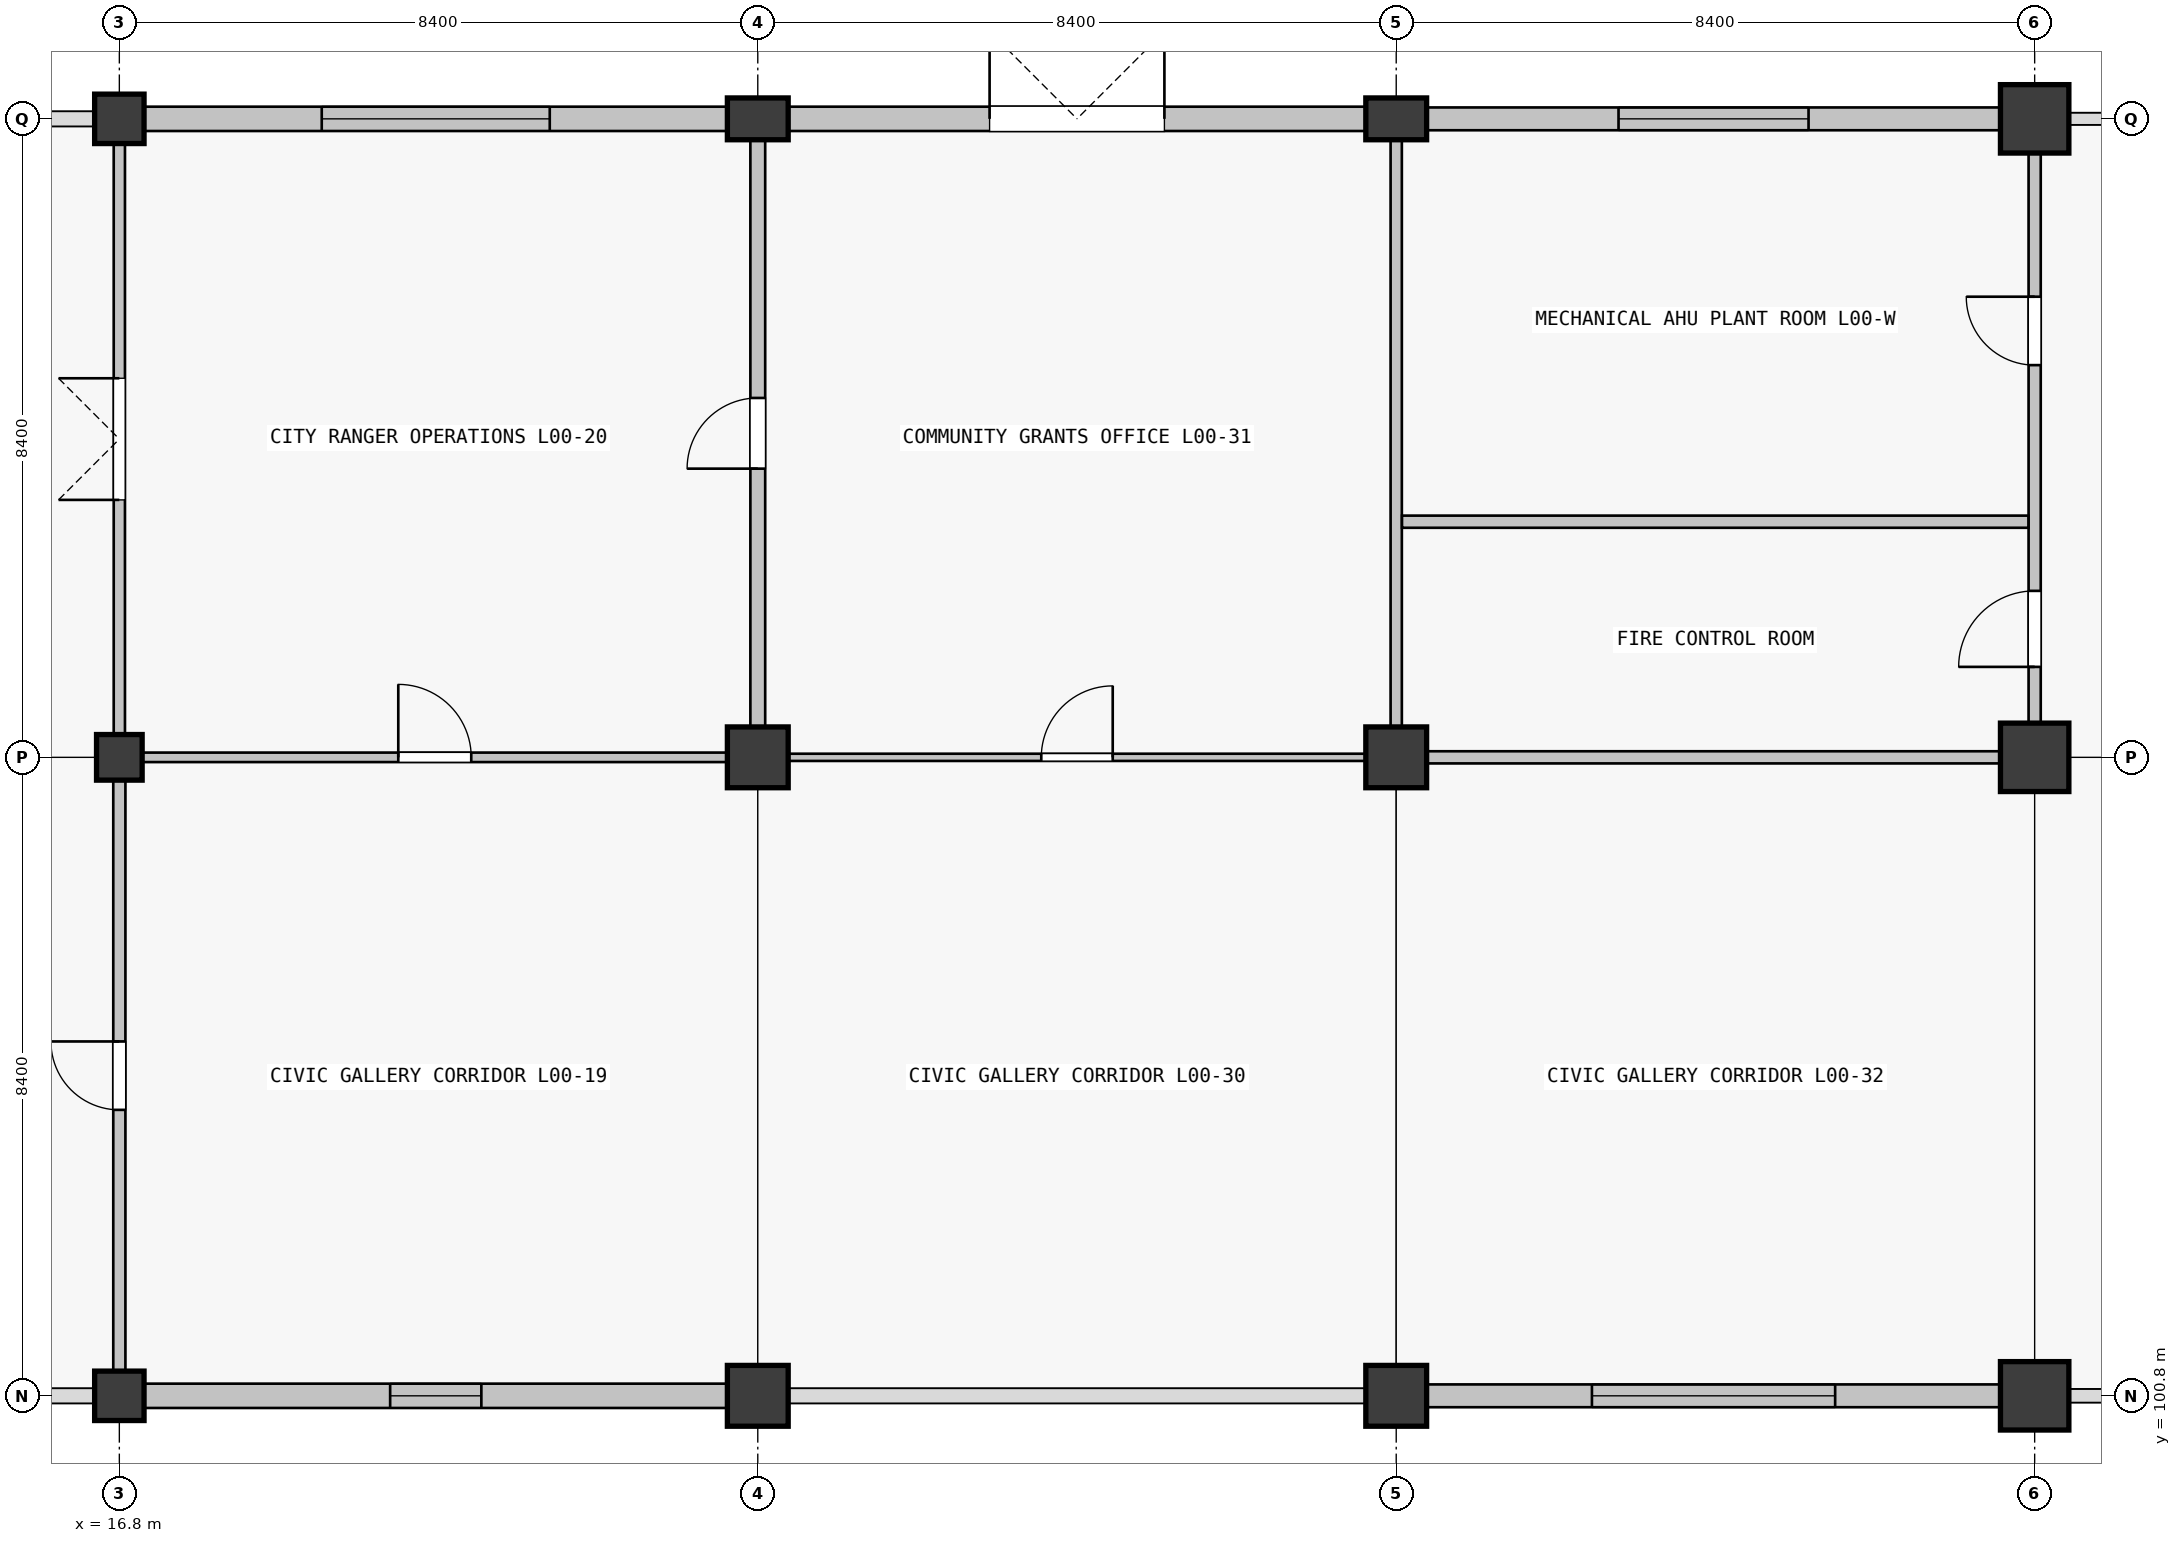
"""IFC4 building model, lengths in metres.
Left out: names, types, materials, properties, quantities, classifications, styles, units other than length and angle.
Written with IfcOpenShell. Run it as: python <this file> out.ifc"""

import sys

from ifc_helpers import new_model, si_unit, direction, frame, frame_2d, origin, origin_2d, place, context, subcontext, project, spatial, rectangle, extrude, element, fill, save


model = new_model("IFC4")
c1 = context("Model", 3, precision=1e-05, world=origin(), true_north=direction((0.0, 1.0)))
c2 = subcontext(c1, "Body", "Model", "MODEL_VIEW")
j1 = project(units=[si_unit("LENGTHUNIT", "METRE"), si_unit("PLANEANGLEUNIT", "RADIAN")], contexts=[c1])
p1 = place(None, origin())
s1 = spatial("IfcSite", under=j1, at=p1, CompositionType="ELEMENT")
p2 = place(p1, origin())
s2 = spatial("IfcBuilding", under=s1, at=p2, CompositionType="ELEMENT")
p3 = place(p2, origin())
s3 = spatial("IfcBuildingStorey", under=s2, at=p3, CompositionType="ELEMENT", Elevation=0.0)
p4 = place(p3, frame((16.8, 100.8, 0.0), z_axis=(0.0, 0.0, 1.0), x_axis=(1.0, 0.0, 0.0)))
e1 = element("IfcColumn", 1, at=p4, inside=s3, PredefinedType="COLUMN", context=c2, shape_type="SweptSolid", body=[
    extrude(rectangle(XDim=0.65, YDim=0.65, at=origin_2d()), origin(), (0.0, 0.0, 1.0), 5.76),
])
p5 = place(p3, frame((16.8, 109.2, 0.0), z_axis=(0.0, 0.0, 1.0), x_axis=(1.0, 0.0, 0.0)))
e2 = element("IfcColumn", 2, at=p5, inside=s3, PredefinedType="COLUMN", context=c2, shape_type="SweptSolid", body=[
    extrude(rectangle(XDim=0.6, YDim=0.6, at=origin_2d()), origin(), (0.0, 0.0, 1.0), 5.76),
])
p6 = place(p3, frame((16.8, 117.6, 0.0), z_axis=(0.0, 0.0, 1.0), x_axis=(1.0, 0.0, 0.0)))
e3 = element("IfcColumn", 3, at=p6, inside=s3, PredefinedType="COLUMN", context=c2, shape_type="SweptSolid", body=[
    extrude(rectangle(XDim=0.65, YDim=0.65, at=origin_2d()), origin(), (0.0, 0.0, 1.0), 5.76),
])
for number, where, z_axis, x_axis in (
    (4, (25.2, 100.8, 0.0), (0.0, 0.0, 1.0), (1.0, 0.0, 0.0)),
    (5, (25.2, 109.2, 0.0), (0.0, 0.0, 1.0), (1.0, 0.0, 0.0)),
):
    element("IfcColumn", number, at=place(p3, frame(where, z_axis=z_axis, x_axis=x_axis)), inside=s3, PredefinedType="COLUMN", context=c2, shape_type="SweptSolid", body=[
        extrude(rectangle(XDim=0.8, YDim=0.8, at=origin_2d()), origin(), (0.0, 0.0, 1.0), 5.76),
    ])
p7 = place(p3, frame((25.2, 117.6, 0.0), z_axis=(0.0, 0.0, 1.0), x_axis=(1.0, 0.0, 0.0)))
e6 = element("IfcColumn", 6, at=p7, inside=s3, PredefinedType="COLUMN", context=c2, shape_type="SweptSolid", body=[
    extrude(rectangle(XDim=0.8, YDim=0.55, at=origin_2d()), origin(), (0.0, 0.0, 1.0), 5.76),
])
for number, where, z_axis, x_axis in (
    (7, (33.6, 100.8, 0.0), (0.0, 0.0, 1.0), (1.0, 0.0, 0.0)),
    (8, (33.6, 109.2, 0.0), (0.0, 0.0, 1.0), (1.0, 0.0, 0.0)),
):
    element("IfcColumn", number, at=place(p3, frame(where, z_axis=z_axis, x_axis=x_axis)), inside=s3, PredefinedType="COLUMN", context=c2, shape_type="SweptSolid", body=[
        extrude(rectangle(XDim=0.8, YDim=0.8, at=origin_2d()), origin(), (0.0, 0.0, 1.0), 5.76),
    ])
p8 = place(p3, frame((33.6, 117.6, 0.0), z_axis=(0.0, 0.0, 1.0), x_axis=(1.0, 0.0, 0.0)))
e9 = element("IfcColumn", 9, at=p8, inside=s3, PredefinedType="COLUMN", context=c2, shape_type="SweptSolid", body=[
    extrude(rectangle(XDim=0.8, YDim=0.55, at=origin_2d()), origin(), (0.0, 0.0, 1.0), 5.76),
])
for number, where, z_axis, x_axis in (
    (10, (42.0, 100.8, 0.0), (0.0, 0.0, 1.0), (1.0, 0.0, 0.0)),
    (11, (42.0, 109.2, 0.0), (0.0, 0.0, 1.0), (1.0, 0.0, 0.0)),
    (12, (42.0, 117.6, 0.0), (0.0, 0.0, 1.0), (1.0, 0.0, 0.0)),
):
    element("IfcColumn", number, at=place(p3, frame(where, z_axis=z_axis, x_axis=x_axis)), inside=s3, PredefinedType="COLUMN", context=c2, shape_type="SweptSolid", body=[
        extrude(rectangle(XDim=0.9, YDim=0.9, at=origin_2d()), origin(), (0.0, 0.0, 1.0), 5.76),
    ])
p9 = place(p3, frame((24.799, 100.8, 0.0), z_axis=(0.0, 0.0, 1.0), x_axis=(-1.0, 0.0, 0.0)))
e13 = element("IfcWall", 13, at=p9, inside=s3, PredefinedType="SOLIDWALL", context=c2, shape_type="SweptSolid", body=[
    extrude(rectangle(XDim=7.673, YDim=0.32, at=frame_2d((3.836, 0.0))), origin(), (0.0, 0.0, 1.0), 4.7),
])
p10 = place(p9, frame((3.236, 0.0, 0.9)))
e14 = element("IfcOpeningElement", 14, at=p10, cuts=e13, PredefinedType="OPENING", context=c2, shape_type="SweptSolid", body=[
    extrude(rectangle(XDim=1.2, YDim=2.1, at=frame_2d((0.6, 1.05))), frame((0.0, 0.16, 0.0), z_axis=(0.0, -1.0, 0.0), x_axis=(1.0, 0.0, 0.0)), (0.0, 0.0, 1.0), 0.32),
])
p11 = place(p3, frame((17.126, 117.6, 0.0), z_axis=(0.0, 0.0, 1.0), x_axis=(1.0, 0.0, 0.0)))
e15 = element("IfcWall", 15, at=p11, inside=s3, PredefinedType="SOLIDWALL", context=c2, shape_type="SweptSolid", body=[
    extrude(rectangle(XDim=7.673, YDim=0.32, at=frame_2d((3.836, 0.0))), origin(), (0.0, 0.0, 1.0), 4.7),
])
p12 = place(p11, frame((2.337, 0.0, 0.9)))
e16 = element("IfcOpeningElement", 16, at=p12, cuts=e15, PredefinedType="OPENING", context=c2, shape_type="SweptSolid", body=[
    extrude(rectangle(XDim=3.0, YDim=1.2, at=frame_2d((1.5, 0.6))), frame((0.0, 0.16, 0.0), z_axis=(0.0, -1.0, 0.0), x_axis=(1.0, 0.0, 0.0)), (0.0, 0.0, 1.0), 0.32),
])
p13 = place(p3, frame((25.601, 117.6, 0.0), z_axis=(0.0, 0.0, 1.0), x_axis=(1.0, 0.0, 0.0)))
e17 = element("IfcWall", 17, at=p13, inside=s3, PredefinedType="SOLIDWALL", context=c2, shape_type="SweptSolid", body=[
    extrude(rectangle(XDim=7.598, YDim=0.32, at=frame_2d((3.799, 0.0))), origin(), (0.0, 0.0, 1.0), 4.7),
])
p14 = place(p13, frame((2.649, 0.0, 0.0)))
e18 = element("IfcOpeningElement", 18, at=p14, cuts=e17, PredefinedType="OPENING", context=c2, shape_type="SweptSolid", body=[
    extrude(rectangle(XDim=2.3, YDim=2.3, at=frame_2d((1.15, 1.15))), frame((0.0, 0.16, 0.0), z_axis=(0.0, -1.0, 0.0), x_axis=(1.0, 0.0, 0.0)), (0.0, 0.0, 1.0), 0.32),
])
p15 = place(p3, frame((41.549, 100.8, 0.0), z_axis=(0.0, 0.0, 1.0), x_axis=(-1.0, 0.0, 0.0)))
e19 = element("IfcWall", 19, at=p15, inside=s3, PredefinedType="SOLIDWALL", context=c2, shape_type="SweptSolid", body=[
    extrude(rectangle(XDim=7.548, YDim=0.3, at=frame_2d((3.774, 0.0))), origin(), (0.0, 0.0, 1.0), 4.7),
])
p16 = place(p15, frame((2.174, 0.0, 0.9)))
e20 = element("IfcOpeningElement", 20, at=p16, cuts=e19, PredefinedType="OPENING", context=c2, shape_type="SweptSolid", body=[
    extrude(rectangle(XDim=3.2, YDim=1.75, at=frame_2d((1.6, 0.875))), frame((0.0, 0.15, 0.0), z_axis=(0.0, -1.0, 0.0), x_axis=(1.0, 0.0, 0.0)), (0.0, 0.0, 1.0), 0.3),
])
p17 = place(p3, frame((34.001, 117.6, 0.0), z_axis=(0.0, 0.0, 1.0), x_axis=(1.0, 0.0, 0.0)))
e21 = element("IfcWall", 21, at=p17, inside=s3, PredefinedType="SOLIDWALL", context=c2, shape_type="SweptSolid", body=[
    extrude(rectangle(XDim=7.548, YDim=0.3, at=frame_2d((3.774, 0.0))), origin(), (0.0, 0.0, 1.0), 4.7),
])
p18 = place(p17, frame((2.524, 0.0, 0.9)))
e22 = element("IfcOpeningElement", 22, at=p18, cuts=e21, PredefinedType="OPENING", context=c2, shape_type="SweptSolid", body=[
    extrude(rectangle(XDim=2.5, YDim=1.65, at=frame_2d((1.25, 0.825))), frame((0.0, 0.15, 0.0), z_axis=(0.0, -1.0, 0.0), x_axis=(1.0, 0.0, 0.0)), (0.0, 0.0, 1.0), 0.3),
])
p19 = place(p3, frame((17.102, 109.2, 0.0), z_axis=(0.0, 0.0, 1.0), x_axis=(1.0, 0.0, 0.0)))
e23 = element("IfcWall", 23, at=p19, inside=s3, PredefinedType="PARTITIONING", context=c2, shape_type="SweptSolid", body=[
    extrude(rectangle(XDim=7.696, YDim=0.125, at=frame_2d((3.848, 0.0))), origin(), (0.0, 0.0, 1.0), 3.66),
])
p20 = place(p19, frame((3.368, 0.0, 0.0)))
e24 = element("IfcOpeningElement", 24, at=p20, cuts=e23, PredefinedType="OPENING", context=c2, shape_type="SweptSolid", body=[
    extrude(rectangle(XDim=0.96, YDim=2.18, at=frame_2d((0.48, 1.09))), frame((0.0, 0.062, 0.0), z_axis=(0.0, -1.0, 0.0), x_axis=(1.0, 0.0, 0.0)), (0.0, 0.0, 1.0), 0.125),
])
p21 = place(p3, frame((25.602, 109.2, 0.0), z_axis=(0.0, 0.0, 1.0), x_axis=(1.0, 0.0, 0.0)))
e25 = element("IfcWall", 25, at=p21, inside=s3, PredefinedType="PARTITIONING", context=c2, shape_type="SweptSolid", body=[
    extrude(rectangle(XDim=7.596, YDim=0.095, at=frame_2d((3.798, 0.0))), origin(), (0.0, 0.0, 1.0), 3.66),
])
p22 = place(p21, frame((3.328, 0.0, 0.0)))
e26 = element("IfcOpeningElement", 26, at=p22, cuts=e25, PredefinedType="OPENING", context=c2, shape_type="SweptSolid", body=[
    extrude(rectangle(XDim=0.94, YDim=2.15, at=frame_2d((0.47, 1.075))), frame((0.0, 0.047, 0.0), z_axis=(0.0, -1.0, 0.0), x_axis=(1.0, 0.0, 0.0)), (0.0, 0.0, 1.0), 0.095),
])
p23 = place(p3, frame((34.002, 109.2, 0.0), z_axis=(0.0, 0.0, 1.0), x_axis=(1.0, 0.0, 0.0)))
e27 = element("IfcWall", 27, at=p23, inside=s3, PredefinedType="PARTITIONING", context=c2, shape_type="SweptSolid", body=[
    extrude(rectangle(XDim=7.546, YDim=0.16, at=frame_2d((3.773, 0.0))), origin(), (0.0, 0.0, 1.0), 3.66),
])
p24 = place(p3, frame((16.8, 101.127, 0.0), z_axis=(0.0, 0.0, 1.0), x_axis=(0.0, 1.0, 0.0)))
e28 = element("IfcWall", 28, at=p24, inside=s3, PredefinedType="PARTITIONING", context=c2, shape_type="SweptSolid", body=[
    extrude(rectangle(XDim=7.771, YDim=0.16, at=frame_2d((3.885, 0.0))), origin(), (0.0, 0.0, 1.0), 3.66),
])
p25 = place(p24, frame((3.435, 0.0, 0.0)))
e29 = element("IfcOpeningElement", 29, at=p25, cuts=e28, PredefinedType="OPENING", context=c2, shape_type="SweptSolid", body=[
    extrude(rectangle(XDim=0.9, YDim=2.05, at=frame_2d((0.45, 1.025))), frame((0.0, 0.08, 0.0), z_axis=(0.0, -1.0, 0.0), x_axis=(1.0, 0.0, 0.0)), (0.0, 0.0, 1.0), 0.16),
])
p26 = place(p3, frame((16.8, 109.502, 0.0), z_axis=(0.0, 0.0, 1.0), x_axis=(0.0, 1.0, 0.0)))
e30 = element("IfcWall", 30, at=p26, inside=s3, PredefinedType="PARTITIONING", context=c2, shape_type="SweptSolid", body=[
    extrude(rectangle(XDim=7.771, YDim=0.148, at=frame_2d((3.885, 0.0))), origin(), (0.0, 0.0, 1.0), 3.66),
])
p27 = place(p26, frame((3.085, 0.0, 0.0)))
e31 = element("IfcOpeningElement", 31, at=p27, cuts=e30, PredefinedType="OPENING", context=c2, shape_type="SweptSolid", body=[
    extrude(rectangle(XDim=1.6, YDim=2.2, at=frame_2d((0.8, 1.1))), frame((0.0, 0.074, 0.0), z_axis=(0.0, -1.0, 0.0), x_axis=(1.0, 0.0, 0.0)), (0.0, 0.0, 1.0), 0.148),
])
p28 = place(p3, frame((25.2, 109.602, 0.0), z_axis=(0.0, 0.0, 1.0), x_axis=(0.0, 1.0, 0.0)))
e32 = element("IfcWall", 32, at=p28, inside=s3, PredefinedType="PARTITIONING", context=c2, shape_type="SweptSolid", body=[
    extrude(rectangle(XDim=7.721, YDim=0.195, at=frame_2d((3.86, 0.0))), origin(), (0.0, 0.0, 1.0), 3.66),
])
p29 = place(p28, frame((3.396, 0.0, 0.0)))
e33 = element("IfcOpeningElement", 33, at=p29, cuts=e32, PredefinedType="OPENING", context=c2, shape_type="SweptSolid", body=[
    extrude(rectangle(XDim=0.93, YDim=2.12, at=frame_2d((0.465, 1.06))), frame((0.0, 0.098, 0.0), z_axis=(0.0, -1.0, 0.0), x_axis=(1.0, 0.0, 0.0)), (0.0, 0.0, 1.0), 0.195),
])
p30 = place(p3, frame((33.6, 109.602, 0.0), z_axis=(0.0, 0.0, 1.0), x_axis=(0.0, 1.0, 0.0)))
e34 = element("IfcWall", 34, at=p30, inside=s3, PredefinedType="PARTITIONING", context=c2, shape_type="SweptSolid", body=[
    extrude(rectangle(XDim=7.721, YDim=0.148, at=frame_2d((3.86, 0.0))), origin(), (0.0, 0.0, 1.0), 3.66),
])
p31 = place(p3, frame((42.0, 109.652, 0.0), z_axis=(0.0, 0.0, 1.0), x_axis=(0.0, 1.0, 0.0)))
e35 = element("IfcWall", 35, at=p31, inside=s3, PredefinedType="PARTITIONING", context=c2, shape_type="SweptSolid", body=[
    extrude(rectangle(XDim=7.496, YDim=0.16, at=frame_2d((3.748, 0.0))), origin(), (0.0, 0.0, 1.0), 3.66),
])
p32 = place(p31, frame((0.738, 0.0, 0.0)))
e36 = element("IfcOpeningElement", 36, at=p32, cuts=e35, PredefinedType="OPENING", context=c2, shape_type="SweptSolid", body=[
    extrude(rectangle(XDim=1.0, YDim=2.15, at=frame_2d((0.5, 1.075))), frame((0.0, 0.08, 0.0), z_axis=(0.0, -1.0, 0.0), x_axis=(1.0, 0.0, 0.0)), (0.0, 0.0, 1.0), 0.16),
])
p33 = place(p31, frame((4.708, 0.0, 0.0)))
e37 = element("IfcOpeningElement", 37, at=p33, cuts=e35, PredefinedType="OPENING", context=c2, shape_type="SweptSolid", body=[
    extrude(rectangle(XDim=0.9, YDim=2.05, at=frame_2d((0.45, 1.025))), frame((0.0, 0.08, 0.0), z_axis=(0.0, -1.0, 0.0), x_axis=(1.0, 0.0, 0.0)), (0.0, 0.0, 1.0), 0.16),
])
p34 = place(p3, frame((33.676, 112.3, 0.0), z_axis=(0.0, 0.0, 1.0), x_axis=(1.0, 0.0, 0.0)))
e38 = element("IfcWall", 38, at=p34, inside=s3, PredefinedType="PARTITIONING", context=c2, shape_type="SweptSolid", body=[
    extrude(rectangle(XDim=8.242, YDim=0.16, at=frame_2d((4.121, 0.0))), origin(), (0.0, 0.0, 1.0), 3.66),
])
p35 = place(p10, origin())
e39 = element("IfcWindow", 39, at=p35, inside=s3, PartitioningType="SINGLE_PANEL", PredefinedType="WINDOW", context=c2, shape_type="SweptSolid", body=[
    extrude(rectangle(XDim=1.2, YDim=2.1, at=frame_2d((0.6, 1.05))), frame((0.0, 0.03, 0.0), z_axis=(0.0, -1.0, 0.0), x_axis=(1.0, 0.0, 0.0)), (0.0, 0.0, 1.0), 0.06),
])
fill(e14, e39)
p36 = place(p12, origin())
e40 = element("IfcWindow", 40, at=p36, inside=s3, PartitioningType="SINGLE_PANEL", PredefinedType="WINDOW", context=c2, shape_type="SweptSolid", body=[
    extrude(rectangle(XDim=3.0, YDim=1.2, at=frame_2d((1.5, 0.6))), frame((0.0, 0.03, 0.0), z_axis=(0.0, -1.0, 0.0), x_axis=(1.0, 0.0, 0.0)), (0.0, 0.0, 1.0), 0.06),
])
fill(e16, e40)
p37 = place(p14, origin())
e41 = element("IfcDoor", 41, at=p37, inside=s3, OperationType="DOUBLE_DOOR_SINGLE_SWING", PredefinedType="DOOR", context=c2, shape_type="SweptSolid", body=[
    extrude(rectangle(XDim=2.3, YDim=2.3, at=frame_2d((1.15, 1.15))), frame((0.0, 0.025, 0.0), z_axis=(0.0, -1.0, 0.0), x_axis=(1.0, 0.0, 0.0)), (0.0, 0.0, 1.0), 0.05),
])
fill(e18, e41)
p38 = place(p16, origin())
e42 = element("IfcWindow", 42, at=p38, inside=s3, PartitioningType="SINGLE_PANEL", PredefinedType="WINDOW", context=c2, shape_type="SweptSolid", body=[
    extrude(rectangle(XDim=3.2, YDim=1.75, at=frame_2d((1.6, 0.875))), frame((0.0, 0.03, 0.0), z_axis=(0.0, -1.0, 0.0), x_axis=(1.0, 0.0, 0.0)), (0.0, 0.0, 1.0), 0.06),
])
fill(e20, e42)
p39 = place(p18, origin())
e43 = element("IfcWindow", 43, at=p39, inside=s3, PartitioningType="SINGLE_PANEL", PredefinedType="WINDOW", context=c2, shape_type="SweptSolid", body=[
    extrude(rectangle(XDim=2.5, YDim=1.65, at=frame_2d((1.25, 0.825))), frame((0.0, 0.03, 0.0), z_axis=(0.0, -1.0, 0.0), x_axis=(1.0, 0.0, 0.0)), (0.0, 0.0, 1.0), 0.06),
])
fill(e22, e43)
p40 = place(p32, origin())
e44 = element("IfcDoor", 44, at=p40, inside=s3, OperationType="SINGLE_SWING_LEFT", PredefinedType="DOOR", context=c2, shape_type="SweptSolid", body=[
    extrude(rectangle(XDim=1.0, YDim=2.15, at=frame_2d((0.5, 1.075))), frame((0.0, 0.025, 0.0), z_axis=(0.0, -1.0, 0.0), x_axis=(1.0, 0.0, 0.0)), (0.0, 0.0, 1.0), 0.05),
])
fill(e36, e44)
p41 = place(p33, origin())
e45 = element("IfcDoor", 45, at=p41, inside=s3, OperationType="SINGLE_SWING_RIGHT", PredefinedType="DOOR", context=c2, shape_type="SweptSolid", body=[
    extrude(rectangle(XDim=0.9, YDim=2.05, at=frame_2d((0.45, 1.025))), frame((0.0, 0.025, 0.0), z_axis=(0.0, -1.0, 0.0), x_axis=(1.0, 0.0, 0.0)), (0.0, 0.0, 1.0), 0.05),
])
fill(e37, e45)
p42 = place(p20, origin())
e46 = element("IfcDoor", 46, at=p42, inside=s3, OperationType="SINGLE_SWING_LEFT", PredefinedType="DOOR", context=c2, shape_type="SweptSolid", body=[
    extrude(rectangle(XDim=0.96, YDim=2.18, at=frame_2d((0.48, 1.09))), frame((0.0, 0.025, 0.0), z_axis=(0.0, -1.0, 0.0), x_axis=(1.0, 0.0, 0.0)), (0.0, 0.0, 1.0), 0.05),
])
fill(e24, e46)
p43 = place(p22, origin())
e47 = element("IfcDoor", 47, at=p43, inside=s3, OperationType="SINGLE_SWING_RIGHT", PredefinedType="DOOR", context=c2, shape_type="SweptSolid", body=[
    extrude(rectangle(XDim=0.94, YDim=2.15, at=frame_2d((0.47, 1.075))), frame((0.0, 0.025, 0.0), z_axis=(0.0, -1.0, 0.0), x_axis=(1.0, 0.0, 0.0)), (0.0, 0.0, 1.0), 0.05),
])
fill(e26, e47)
p44 = place(p25, origin())
e48 = element("IfcDoor", 48, at=p44, inside=s3, OperationType="SINGLE_SWING_RIGHT", PredefinedType="DOOR", context=c2, shape_type="SweptSolid", body=[
    extrude(rectangle(XDim=0.9, YDim=2.05, at=frame_2d((0.45, 1.025))), frame((0.0, 0.025, 0.0), z_axis=(0.0, -1.0, 0.0), x_axis=(1.0, 0.0, 0.0)), (0.0, 0.0, 1.0), 0.05),
])
fill(e29, e48)
p45 = place(p27, origin())
e49 = element("IfcDoor", 49, at=p45, inside=s3, OperationType="DOUBLE_DOOR_SINGLE_SWING", PredefinedType="DOOR", context=c2, shape_type="SweptSolid", body=[
    extrude(rectangle(XDim=1.6, YDim=2.2, at=frame_2d((0.8, 1.1))), frame((0.0, 0.025, 0.0), z_axis=(0.0, -1.0, 0.0), x_axis=(1.0, 0.0, 0.0)), (0.0, 0.0, 1.0), 0.05),
])
fill(e31, e49)
p46 = place(p29, origin())
e50 = element("IfcDoor", 50, at=p46, inside=s3, OperationType="SINGLE_SWING_LEFT", PredefinedType="DOOR", context=c2, shape_type="SweptSolid", body=[
    extrude(rectangle(XDim=0.93, YDim=2.12, at=frame_2d((0.465, 1.06))), frame((0.0, 0.025, 0.0), z_axis=(0.0, -1.0, 0.0), x_axis=(1.0, 0.0, 0.0)), (0.0, 0.0, 1.0), 0.05),
])
fill(e33, e50)
save(model, sys.argv[1])
